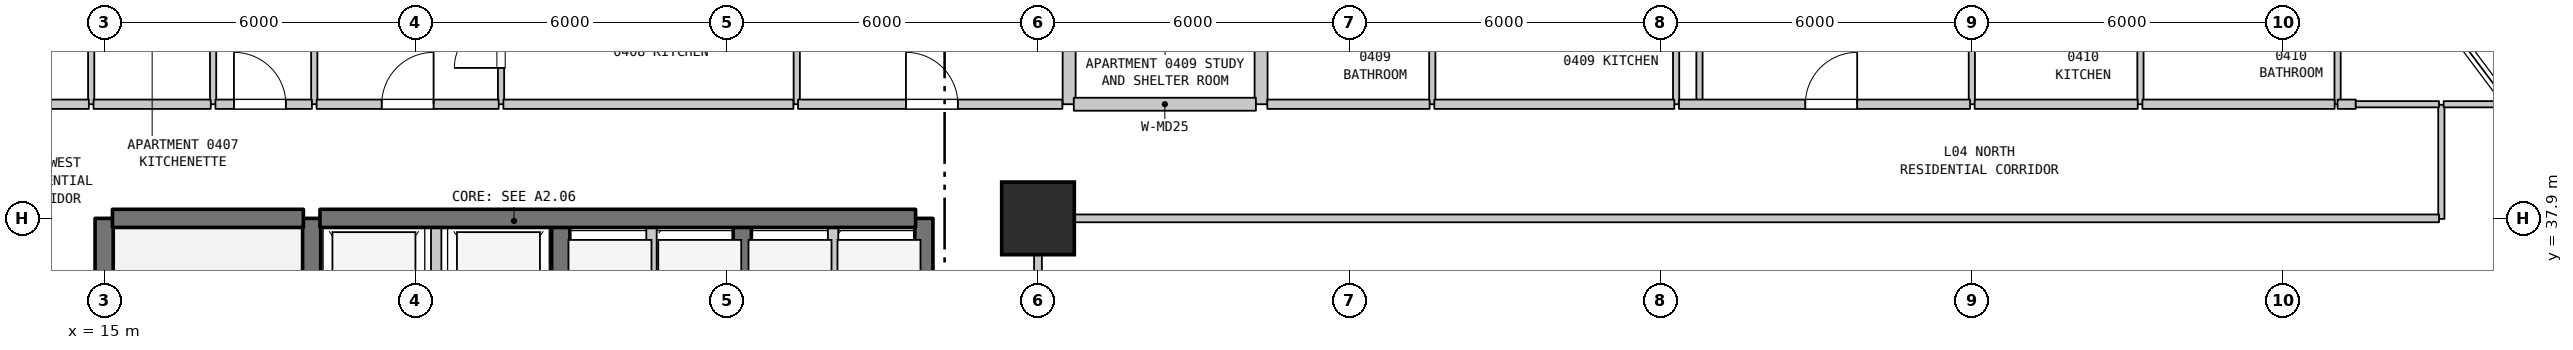
"""IFC4 building model, lengths in metres.
Left out: names, types, materials, properties, quantities, classifications, styles, units other than length and angle.
Written with IfcOpenShell. Run it as: python <this file> out.ifc"""

import sys

from ifc_helpers import new_model, si_unit, direction, frame, frame_2d, origin, origin_2d, place, context, subcontext, project, spatial, rectangle, extrude, element, fill, save


model = new_model("IFC4")
c1 = context("Model", 3, precision=1e-05, world=origin(), true_north=direction((0.0, 1.0)))
c2 = subcontext(c1, "Body", "Model", "MODEL_VIEW")
j1 = project(units=[si_unit("LENGTHUNIT", "METRE"), si_unit("PLANEANGLEUNIT", "RADIAN")], contexts=[c1])
p1 = place(None, origin())
s1 = spatial("IfcSite", under=j1, at=p1, CompositionType="ELEMENT")
p2 = place(p1, origin())
s2 = spatial("IfcBuilding", under=s1, at=p2, CompositionType="ELEMENT")
p3 = place(p2, frame((0.0, 0.0, 24.0)))
s3 = spatial("IfcBuildingStorey", under=s2, at=p3, CompositionType="ELEMENT", Elevation=24.0)
p4 = place(p3, frame((33.0, 37.9, 0.0), z_axis=(0.0, 0.0, 1.0), x_axis=(1.0, 0.0, 0.0)))
e1 = element("IfcColumn", 1, at=p4, inside=s3, PredefinedType="COLUMN", context=c2, shape_type="SweptSolid", body=[
    extrude(rectangle(XDim=1.4, YDim=1.4, at=origin_2d()), origin(), (0.0, 0.0, 1.0), 3.7),
])
p5 = place(p3, frame((14.75, 40.1, 0.0), z_axis=(0.0, 0.0, 1.0), x_axis=(0.0, 1.0, 0.0)))
e2 = element("IfcWall", 2, at=p5, inside=s3, PredefinedType="PARTITIONING", context=c2, shape_type="SweptSolid", body=[
    extrude(rectangle(XDim=3.2, YDim=0.12, at=frame_2d((1.6, 0.0))), origin(), (0.0, 0.0, 1.0), 3.385),
])
p6 = place(p5, frame((1.15, 0.0, 0.0)))
e3 = element("IfcOpeningElement", 3, at=p6, cuts=e2, PredefinedType="OPENING", context=c2, shape_type="SweptSolid", body=[
    extrude(rectangle(XDim=0.9, YDim=2.15, at=frame_2d((0.45, 1.075))), frame((0.0, 0.07, 0.0), z_axis=(0.0, -1.0, 0.0), x_axis=(1.0, 0.0, 0.0)), (0.0, 0.0, 1.0), 0.14),
])
p7 = place(p3, frame((15.0, 31.1, 0.0), z_axis=(0.0, 0.0, 1.0), x_axis=(0.0, 1.0, 0.0)))
e4 = element("IfcWall", 4, at=p7, inside=s3, PredefinedType="SHEAR", context=c2, shape_type="SweptSolid", body=[
    extrude(rectangle(XDim=6.8, YDim=0.35, at=frame_2d((3.4, 0.0))), origin(), (0.0, 0.0, 1.0), 3.385),
])
p8 = place(p3, frame((17.1, 40.1, 0.0), z_axis=(0.0, 0.0, 1.0), x_axis=(0.0, 1.0, 0.0)))
e5 = element("IfcWall", 5, at=p8, inside=s3, PredefinedType="PARTITIONING", context=c2, shape_type="SweptSolid", body=[
    extrude(rectangle(XDim=3.2, YDim=0.12, at=frame_2d((1.6, 0.0))), origin(), (0.0, 0.0, 1.0), 3.385),
])
p9 = place(p3, frame((19.0, 35.0, 0.0), z_axis=(0.0, 0.0, 1.0), x_axis=(0.0, 1.0, 0.0)))
e6 = element("IfcWall", 6, at=p9, inside=s3, PredefinedType="SHEAR", context=c2, shape_type="SweptSolid", body=[
    extrude(rectangle(XDim=2.9, YDim=0.35, at=frame_2d((1.45, 0.0))), origin(), (0.0, 0.0, 1.0), 3.385),
])
p10 = place(p3, frame((19.05, 40.1, 0.0), z_axis=(0.0, 0.0, 1.0), x_axis=(0.0, 1.0, 0.0)))
e7 = element("IfcWall", 7, at=p10, inside=s3, PredefinedType="PARTITIONING", context=c2, shape_type="SweptSolid", body=[
    extrude(rectangle(XDim=13.79, YDim=0.12, at=frame_2d((6.895, 0.0))), origin(), (0.0, 0.0, 1.0), 3.385),
])
p11 = place(p3, frame((21.4, 35.0, 0.0), z_axis=(0.0, 0.0, 1.0), x_axis=(0.0, 1.0, 0.0)))
e8 = element("IfcWall", 8, at=p11, inside=s3, PredefinedType="STANDARD", context=c2, shape_type="SweptSolid", body=[
    extrude(rectangle(XDim=2.9, YDim=0.2, at=frame_2d((1.45, 0.0))), origin(), (0.0, 0.0, 1.0), 3.385),
])
p12 = place(p3, frame((22.65, 40.1, 0.0), z_axis=(0.0, 0.0, 1.0), x_axis=(0.0, 1.0, 0.0)))
e9 = element("IfcWall", 9, at=p12, inside=s3, PredefinedType="PARTITIONING", context=c2, shape_type="SweptSolid", body=[
    extrude(rectangle(XDim=2.3, YDim=0.12, at=frame_2d((1.15, 0.0))), origin(), (0.0, 0.0, 1.0), 3.385),
])
p13 = place(p12, frame((0.7, 0.0, 0.0)))
e10 = element("IfcOpeningElement", 10, at=p13, cuts=e9, PredefinedType="OPENING", context=c2, shape_type="SweptSolid", body=[
    extrude(rectangle(XDim=0.9, YDim=2.15, at=frame_2d((0.45, 1.075))), frame((0.0, 0.07, 0.0), z_axis=(0.0, -1.0, 0.0), x_axis=(1.0, 0.0, 0.0)), (0.0, 0.0, 1.0), 0.14),
])
p14 = place(p3, frame((23.8, 35.0, 0.0), z_axis=(0.0, 0.0, 1.0), x_axis=(0.0, 1.0, 0.0)))
e11 = element("IfcWall", 11, at=p14, inside=s3, PredefinedType="SHEAR", context=c2, shape_type="SweptSolid", body=[
    extrude(rectangle(XDim=2.9, YDim=0.35, at=frame_2d((1.45, 0.0))), origin(), (0.0, 0.0, 1.0), 3.385),
])
p15 = place(p3, frame((25.55, 35.0, 0.0), z_axis=(0.0, 0.0, 1.0), x_axis=(0.0, 1.0, 0.0)))
e12 = element("IfcWall", 12, at=p15, inside=s3, PredefinedType="STANDARD", context=c2, shape_type="SweptSolid", body=[
    extrude(rectangle(XDim=2.9, YDim=0.2, at=frame_2d((1.45, 0.0))), origin(), (0.0, 0.0, 1.0), 3.385),
])
p16 = place(p3, frame((27.3, 35.0, 0.0), z_axis=(0.0, 0.0, 1.0), x_axis=(0.0, 1.0, 0.0)))
e13 = element("IfcWall", 13, at=p16, inside=s3, PredefinedType="SHEAR", context=c2, shape_type="SweptSolid", body=[
    extrude(rectangle(XDim=2.9, YDim=0.35, at=frame_2d((1.45, 0.0))), origin(), (0.0, 0.0, 1.0), 3.385),
])
p17 = place(p3, frame((28.35, 40.1, 0.0), z_axis=(0.0, 0.0, 1.0), x_axis=(0.0, 1.0, 0.0)))
e14 = element("IfcWall", 14, at=p17, inside=s3, PredefinedType="PARTITIONING", context=c2, shape_type="SweptSolid", body=[
    extrude(rectangle(XDim=2.05, YDim=0.12, at=frame_2d((1.025, 0.0))), origin(), (0.0, 0.0, 1.0), 3.385),
])
p18 = place(p3, frame((29.05, 35.0, 0.0), z_axis=(0.0, 0.0, 1.0), x_axis=(0.0, 1.0, 0.0)))
e15 = element("IfcWall", 15, at=p18, inside=s3, PredefinedType="STANDARD", context=c2, shape_type="SweptSolid", body=[
    extrude(rectangle(XDim=2.9, YDim=0.2, at=frame_2d((1.45, 0.0))), origin(), (0.0, 0.0, 1.0), 3.385),
])
p19 = place(p3, frame((30.8, 35.0, 0.0), z_axis=(0.0, 0.0, 1.0), x_axis=(0.0, 1.0, 0.0)))
e16 = element("IfcWall", 16, at=p19, inside=s3, PredefinedType="SHEAR", context=c2, shape_type="SweptSolid", body=[
    extrude(rectangle(XDim=2.9, YDim=0.35, at=frame_2d((1.45, 0.0))), origin(), (0.0, 0.0, 1.0), 3.385),
])
p20 = place(p3, frame((33.0, 27.91, 0.0), z_axis=(0.0, 0.0, 1.0), x_axis=(0.0, 1.0, 0.0)))
e17 = element("IfcWall", 17, at=p20, inside=s3, PredefinedType="STANDARD", context=c2, shape_type="SweptSolid", body=[
    extrude(rectangle(XDim=9.98, YDim=0.15, at=frame_2d((4.99, 0.0))), origin(), (0.0, 0.0, 1.0), 2.885),
])
for number, where, z_axis, x_axis in (
    (18, (33.6, 40.1, 0.0), (0.0, 0.0, 1.0), (0.0, 1.0, 0.0)),
    (19, (37.3, 40.1, 0.0), (0.0, 0.0, 1.0), (0.0, 1.0, 0.0)),
):
    element("IfcWall", number, at=place(p3, frame(where, z_axis=z_axis, x_axis=x_axis)), inside=s3, PredefinedType="STANDARD", context=c2, shape_type="SweptSolid", body=[
        extrude(rectangle(XDim=2.3, YDim=0.25, at=frame_2d((1.15, 0.0))), origin(), (0.0, 0.0, 1.0), 3.385),
    ])
for number, where, z_axis, x_axis in (
    (20, (40.6, 40.1, 0.0), (0.0, 0.0, 1.0), (0.0, 1.0, 0.0)),
    (21, (45.3, 40.1, 0.0), (0.0, 0.0, 1.0), (0.0, 1.0, 0.0)),
):
    element("IfcWall", number, at=place(p3, frame(where, z_axis=z_axis, x_axis=x_axis)), inside=s3, PredefinedType="PARTITIONING", context=c2, shape_type="SweptSolid", body=[
        extrude(rectangle(XDim=2.3, YDim=0.12, at=frame_2d((1.15, 0.0))), origin(), (0.0, 0.0, 1.0), 3.385),
    ])
p21 = place(p3, frame((45.75, 40.1, 0.0), z_axis=(0.0, 0.0, 1.0), x_axis=(0.0, 1.0, 0.0)))
e22 = element("IfcWall", 22, at=p21, inside=s3, PredefinedType="PARTITIONING", context=c2, shape_type="SweptSolid", body=[
    extrude(rectangle(XDim=2.05, YDim=0.12, at=frame_2d((1.025, 0.0))), origin(), (0.0, 0.0, 1.0), 3.385),
])
for number, where, z_axis, x_axis in (
    (23, (51.0, 40.1, 0.0), (0.0, 0.0, 1.0), (0.0, 1.0, 0.0)),
    (24, (54.25, 40.1, 0.0), (0.0, 0.0, 1.0), (0.0, 1.0, 0.0)),
    (25, (58.05, 40.1, 0.0), (0.0, 0.0, 1.0), (0.0, 1.0, 0.0)),
):
    element("IfcWall", number, at=place(p3, frame(where, z_axis=z_axis, x_axis=x_axis)), inside=s3, PredefinedType="PARTITIONING", context=c2, shape_type="SweptSolid", body=[
        extrude(rectangle(XDim=2.3, YDim=0.12, at=frame_2d((1.15, 0.0))), origin(), (0.0, 0.0, 1.0), 3.385),
    ])
p22 = place(p3, frame((60.05, 37.89, 0.0), z_axis=(0.0, 0.0, 1.0), x_axis=(0.0, 1.0, 0.0)))
e26 = element("IfcWall", 26, at=p22, inside=s3, PredefinedType="PARTITIONING", context=c2, shape_type="SweptSolid", body=[
    extrude(rectangle(XDim=2.2, YDim=0.12, at=frame_2d((1.1, 0.0))), origin(), (0.0, 0.0, 1.0), 3.385),
])
p23 = place(p3, frame((15.16, 37.9, 0.0), z_axis=(0.0, 0.0, 1.0), x_axis=(1.0, 0.0, 0.0)))
e27 = element("IfcWall", 27, at=p23, inside=s3, PredefinedType="SHEAR", context=c2, shape_type="SweptSolid", body=[
    extrude(rectangle(XDim=3.68, YDim=0.35, at=frame_2d((1.84, 0.0))), origin(), (0.0, 0.0, 1.0), 3.385),
])
p24 = place(p3, frame((19.16, 37.9, 0.0), z_axis=(0.0, 0.0, 1.0), x_axis=(1.0, 0.0, 0.0)))
e28 = element("IfcWall", 28, at=p24, inside=s3, PredefinedType="SHEAR", context=c2, shape_type="SweptSolid", body=[
    extrude(rectangle(XDim=11.48, YDim=0.35, at=frame_2d((5.74, 0.0))), origin(), (0.0, 0.0, 1.0), 3.385),
])
p25 = place(p3, frame((33.07, 37.9, 0.0), z_axis=(0.0, 0.0, 1.0), x_axis=(1.0, 0.0, 0.0)))
e29 = element("IfcWall", 29, at=p25, inside=s3, PredefinedType="STANDARD", context=c2, shape_type="SweptSolid", body=[
    extrude(rectangle(XDim=26.935, YDim=0.15, at=frame_2d((13.467, 0.0))), origin(), (0.0, 0.0, 1.0), 3.385),
])
p26 = place(p3, frame((12.875, 40.1, 0.0), z_axis=(0.0, 0.0, 1.0), x_axis=(1.0, 0.0, 0.0)))
e30 = element("IfcWall", 30, at=p26, inside=s3, PredefinedType="STANDARD", context=c2, shape_type="SweptSolid", body=[
    extrude(rectangle(XDim=1.83, YDim=0.18, at=frame_2d((0.915, 0.0))), origin(), (0.0, 0.0, 1.0), 3.385),
])
p27 = place(p3, frame((14.795, 40.1, 0.0), z_axis=(0.0, 0.0, 1.0), x_axis=(1.0, 0.0, 0.0)))
e31 = element("IfcWall", 31, at=p27, inside=s3, PredefinedType="STANDARD", context=c2, shape_type="SweptSolid", body=[
    extrude(rectangle(XDim=2.26, YDim=0.18, at=frame_2d((1.13, 0.0))), origin(), (0.0, 0.0, 1.0), 3.385),
])
p28 = place(p3, frame((17.145, 40.1, 0.0), z_axis=(0.0, 0.0, 1.0), x_axis=(1.0, 0.0, 0.0)))
e32 = element("IfcWall", 32, at=p28, inside=s3, PredefinedType="STANDARD", context=c2, shape_type="SweptSolid", body=[
    extrude(rectangle(XDim=1.86, YDim=0.18, at=frame_2d((0.93, 0.0))), origin(), (0.0, 0.0, 1.0), 3.385),
])
p29 = place(p28, frame((0.357, 0.0, 0.0)))
e33 = element("IfcOpeningElement", 33, at=p29, cuts=e32, PredefinedType="OPENING", context=c2, shape_type="SweptSolid", body=[
    extrude(rectangle(XDim=1.0, YDim=2.15, at=frame_2d((0.5, 1.075))), frame((0.0, 0.1, 0.0), z_axis=(0.0, -1.0, 0.0), x_axis=(1.0, 0.0, 0.0)), (0.0, 0.0, 1.0), 0.2),
])
p30 = place(p3, frame((19.095, 40.1, 0.0), z_axis=(0.0, 0.0, 1.0), x_axis=(1.0, 0.0, 0.0)))
e34 = element("IfcWall", 34, at=p30, inside=s3, PredefinedType="STANDARD", context=c2, shape_type="SweptSolid", body=[
    extrude(rectangle(XDim=3.51, YDim=0.18, at=frame_2d((1.755, 0.0))), origin(), (0.0, 0.0, 1.0), 3.385),
])
p31 = place(p30, frame((1.255, 0.0, 0.0)))
e35 = element("IfcOpeningElement", 35, at=p31, cuts=e34, PredefinedType="OPENING", context=c2, shape_type="SweptSolid", body=[
    extrude(rectangle(XDim=1.0, YDim=2.15, at=frame_2d((0.5, 1.075))), frame((0.0, 0.1, 0.0), z_axis=(0.0, -1.0, 0.0), x_axis=(1.0, 0.0, 0.0)), (0.0, 0.0, 1.0), 0.2),
])
p32 = place(p3, frame((22.695, 40.1, 0.0), z_axis=(0.0, 0.0, 1.0), x_axis=(1.0, 0.0, 0.0)))
e36 = element("IfcWall", 36, at=p32, inside=s3, PredefinedType="STANDARD", context=c2, shape_type="SweptSolid", body=[
    extrude(rectangle(XDim=5.59, YDim=0.18, at=frame_2d((2.795, 0.0))), origin(), (0.0, 0.0, 1.0), 3.385),
])
p33 = place(p3, frame((28.375, 40.1, 0.0), z_axis=(0.0, 0.0, 1.0), x_axis=(1.0, 0.0, 0.0)))
e37 = element("IfcWall", 37, at=p33, inside=s3, PredefinedType="STANDARD", context=c2, shape_type="SweptSolid", body=[
    extrude(rectangle(XDim=5.095, YDim=0.18, at=frame_2d((2.547, 0.0))), origin(), (0.0, 0.0, 1.0), 3.385),
])
p34 = place(p33, frame((2.08, 0.0, 0.0)))
e38 = element("IfcOpeningElement", 38, at=p34, cuts=e37, PredefinedType="OPENING", context=c2, shape_type="SweptSolid", body=[
    extrude(rectangle(XDim=1.0, YDim=2.15, at=frame_2d((0.5, 1.075))), frame((0.0, 0.1, 0.0), z_axis=(0.0, -1.0, 0.0), x_axis=(1.0, 0.0, 0.0)), (0.0, 0.0, 1.0), 0.2),
])
p35 = place(p3, frame((33.69, 40.1, 0.0), z_axis=(0.0, 0.0, 1.0), x_axis=(1.0, 0.0, 0.0)))
e39 = element("IfcWall", 39, at=p35, inside=s3, PredefinedType="STANDARD", context=c2, shape_type="SweptSolid", body=[
    extrude(rectangle(XDim=3.51, YDim=0.25, at=frame_2d((1.755, 0.0))), origin(), (0.0, 0.0, 1.0), 3.385),
])
p36 = place(p3, frame((37.42, 40.1, 0.0), z_axis=(0.0, 0.0, 1.0), x_axis=(1.0, 0.0, 0.0)))
e40 = element("IfcWall", 40, at=p36, inside=s3, PredefinedType="STANDARD", context=c2, shape_type="SweptSolid", body=[
    extrude(rectangle(XDim=3.129, YDim=0.18, at=frame_2d((1.564, 0.0))), origin(), (0.0, 0.0, 1.0), 3.385),
])
p37 = place(p3, frame((40.639, 40.1, 0.0), z_axis=(0.0, 0.0, 1.0), x_axis=(1.0, 0.0, 0.0)))
e41 = element("IfcWall", 41, at=p37, inside=s3, PredefinedType="STANDARD", context=c2, shape_type="SweptSolid", body=[
    extrude(rectangle(XDim=4.626, YDim=0.18, at=frame_2d((2.313, 0.0))), origin(), (0.0, 0.0, 1.0), 3.385),
])
p38 = place(p3, frame((45.355, 40.1, 0.0), z_axis=(0.0, 0.0, 1.0), x_axis=(1.0, 0.0, 0.0)))
e42 = element("IfcWall", 42, at=p38, inside=s3, PredefinedType="STANDARD", context=c2, shape_type="SweptSolid", body=[
    extrude(rectangle(XDim=5.61, YDim=0.18, at=frame_2d((2.805, 0.0))), origin(), (0.0, 0.0, 1.0), 3.385),
])
p39 = place(p38, frame((2.435, 0.0, 0.0)))
e43 = element("IfcOpeningElement", 43, at=p39, cuts=e42, PredefinedType="OPENING", context=c2, shape_type="SweptSolid", body=[
    extrude(rectangle(XDim=1.0, YDim=2.15, at=frame_2d((0.5, 1.075))), frame((0.0, 0.1, 0.0), z_axis=(0.0, -1.0, 0.0), x_axis=(1.0, 0.0, 0.0)), (0.0, 0.0, 1.0), 0.2),
])
p40 = place(p3, frame((51.055, 40.1, 0.0), z_axis=(0.0, 0.0, 1.0), x_axis=(1.0, 0.0, 0.0)))
e44 = element("IfcWall", 44, at=p40, inside=s3, PredefinedType="STANDARD", context=c2, shape_type="SweptSolid", body=[
    extrude(rectangle(XDim=3.143, YDim=0.18, at=frame_2d((1.572, 0.0))), origin(), (0.0, 0.0, 1.0), 3.385),
])
p41 = place(p3, frame((54.288, 40.1, 0.0), z_axis=(0.0, 0.0, 1.0), x_axis=(1.0, 0.0, 0.0)))
e45 = element("IfcWall", 45, at=p41, inside=s3, PredefinedType="STANDARD", context=c2, shape_type="SweptSolid", body=[
    extrude(rectangle(XDim=3.705, YDim=0.18, at=frame_2d((1.853, 0.0))), origin(), (0.0, 0.0, 1.0), 3.385),
])
p42 = place(p3, frame((58.05, 40.1, 0.0), z_axis=(0.0, 0.0, 1.0), x_axis=(1.0, 0.0, 0.0)))
e46 = element("IfcWall", 46, at=p42, inside=s3, PredefinedType="STANDARD", context=c2, shape_type="SweptSolid", body=[
    extrude(rectangle(XDim=0.35, YDim=0.18, at=frame_2d((0.175, 0.0))), origin(), (0.0, 0.0, 1.0), 3.385),
])
p43 = place(p3, frame((58.4, 40.1, 0.0), z_axis=(0.0, 0.0, 1.0), x_axis=(1.0, 0.0, 0.0)))
e47 = element("IfcWall", 47, at=p43, inside=s3, PredefinedType="PARTITIONING", context=c2, shape_type="SweptSolid", body=[
    extrude(rectangle(XDim=1.605, YDim=0.12, at=frame_2d((0.802, 0.0))), origin(), (0.0, 0.0, 1.0), 3.385),
])
p44 = place(p3, frame((60.095, 40.1, 0.0), z_axis=(0.0, 0.0, 1.0), x_axis=(1.0, 0.0, 0.0)))
e48 = element("IfcWall", 48, at=p44, inside=s3, PredefinedType="PARTITIONING", context=c2, shape_type="SweptSolid", body=[
    extrude(rectangle(XDim=1.245, YDim=0.12, at=frame_2d((0.623, 0.0))), origin(), (0.0, 0.0, 1.0), 3.385),
])
p45 = place(p13, origin())
e49 = element("IfcDoor", 49, at=p45, inside=s3, OperationType="SINGLE_SWING_LEFT", PredefinedType="DOOR", context=c2, shape_type="SweptSolid", body=[
    extrude(rectangle(XDim=0.9, YDim=2.15, at=frame_2d((0.45, 1.075))), frame((0.0, 0.025, 0.0), z_axis=(0.0, -1.0, 0.0), x_axis=(1.0, 0.0, 0.0)), (0.0, 0.0, 1.0), 0.05),
])
fill(e10, e49)
p46 = place(p29, origin())
e50 = element("IfcDoor", 50, at=p46, inside=s3, OperationType="SINGLE_SWING_LEFT", PredefinedType="DOOR", context=c2, shape_type="SweptSolid", body=[
    extrude(rectangle(XDim=1.0, YDim=2.15, at=frame_2d((0.5, 1.075))), frame((0.0, 0.025, 0.0), z_axis=(0.0, -1.0, 0.0), x_axis=(1.0, 0.0, 0.0)), (0.0, 0.0, 1.0), 0.05),
])
fill(e33, e50)
p47 = place(p31, origin())
e51 = element("IfcDoor", 51, at=p47, inside=s3, OperationType="SINGLE_SWING_RIGHT", PredefinedType="DOOR", context=c2, shape_type="SweptSolid", body=[
    extrude(rectangle(XDim=1.0, YDim=2.15, at=frame_2d((0.5, 1.075))), frame((0.0, 0.025, 0.0), z_axis=(0.0, -1.0, 0.0), x_axis=(1.0, 0.0, 0.0)), (0.0, 0.0, 1.0), 0.05),
])
fill(e35, e51)
p48 = place(p34, origin())
e52 = element("IfcDoor", 52, at=p48, inside=s3, OperationType="SINGLE_SWING_LEFT", PredefinedType="DOOR", context=c2, shape_type="SweptSolid", body=[
    extrude(rectangle(XDim=1.0, YDim=2.15, at=frame_2d((0.5, 1.075))), frame((0.0, 0.025, 0.0), z_axis=(0.0, -1.0, 0.0), x_axis=(1.0, 0.0, 0.0)), (0.0, 0.0, 1.0), 0.05),
])
fill(e38, e52)
p49 = place(p39, origin())
e53 = element("IfcDoor", 53, at=p49, inside=s3, OperationType="SINGLE_SWING_RIGHT", PredefinedType="DOOR", context=c2, shape_type="SweptSolid", body=[
    extrude(rectangle(XDim=1.0, YDim=2.15, at=frame_2d((0.5, 1.075))), frame((0.0, 0.025, 0.0), z_axis=(0.0, -1.0, 0.0), x_axis=(1.0, 0.0, 0.0)), (0.0, 0.0, 1.0), 0.05),
])
fill(e43, e53)
save(model, sys.argv[1])
